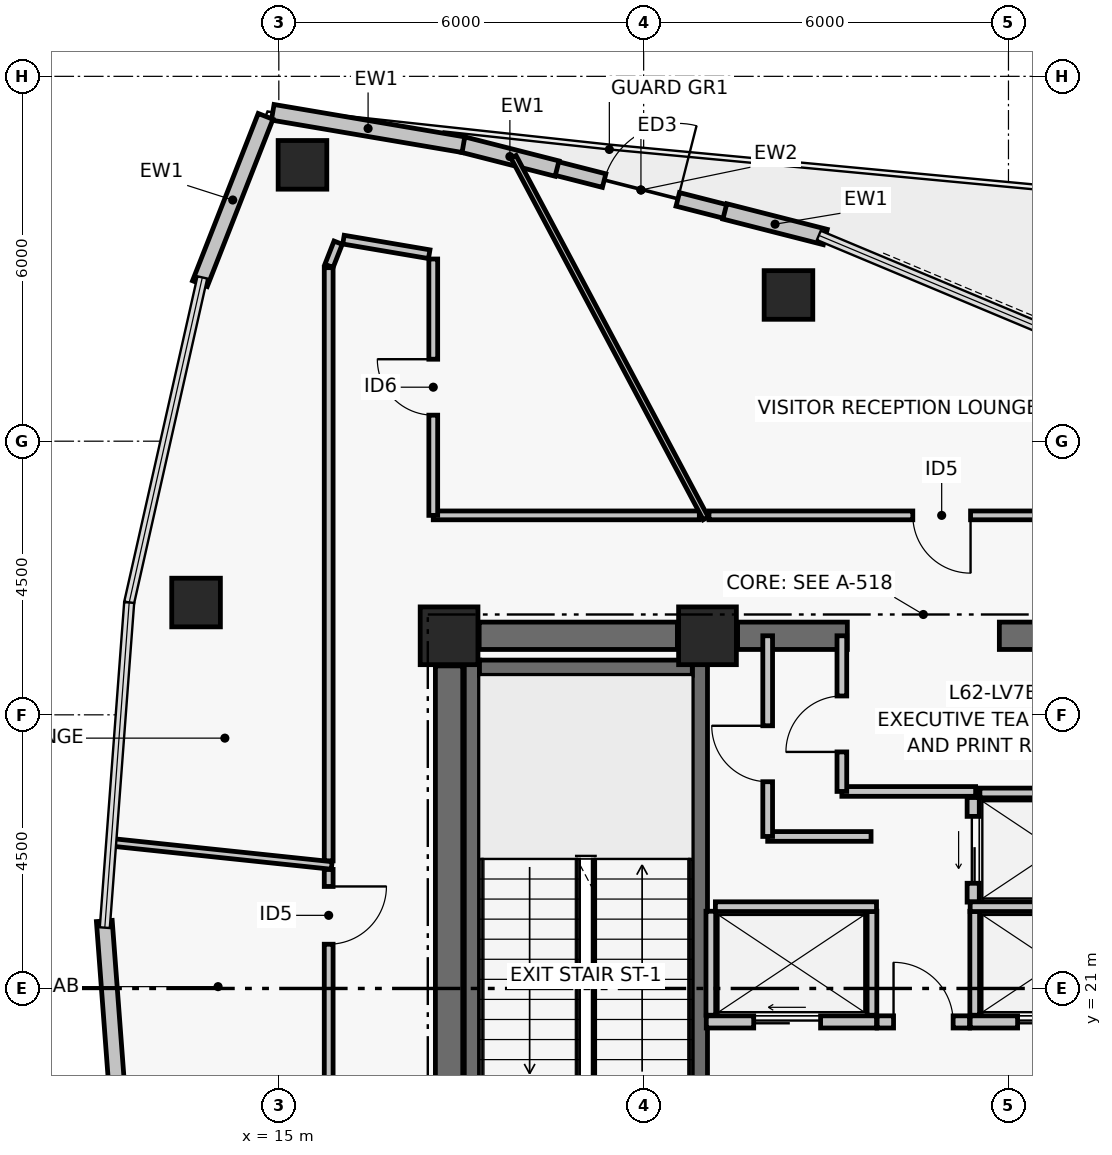
"""IFC4 building model, lengths in metres.
Left out: names, types, materials, properties, quantities, classifications, styles, units other than length and angle.
Written with IfcOpenShell. Run it as: python <this file> out.ifc"""

import sys

from ifc_helpers import new_model, si_unit, direction, frame, frame_2d, origin, origin_2d, place, context, subcontext, project, spatial, rectangle, hollow_rectangle, extrude, element, fill, save


model = new_model("IFC4")
c1 = context("Model", 3, precision=1e-05, world=origin(), true_north=direction((0.0, 1.0)))
c2 = subcontext(c1, "Body", "Model", "MODEL_VIEW")
j1 = project(units=[si_unit("LENGTHUNIT", "METRE"), si_unit("PLANEANGLEUNIT", "RADIAN")], contexts=[c1])
p1 = place(None, origin())
s1 = spatial("IfcSite", under=j1, at=p1, CompositionType="ELEMENT")
p2 = place(p1, origin())
s2 = spatial("IfcBuilding", under=s1, at=p2, CompositionType="ELEMENT")
p3 = place(p2, frame((0.0, 0.0, 247.14)))
s3 = spatial("IfcBuildingStorey", under=s2, at=p3, CompositionType="ELEMENT", Elevation=247.14)
for number, where, z_axis, x_axis in (
    (1, (17.8, 26.8, 0.0), (0.0, 0.0, 1.0), (1.0, 0.0, 0.0)),
    (2, (22.05, 26.8, 0.0), (0.0, 0.0, 1.0), (1.0, 0.0, 0.0)),
):
    element("IfcColumn", number, at=place(p3, frame(where, z_axis=z_axis, x_axis=x_axis)), inside=s3, PredefinedType="COLUMN", context=c2, shape_type="SweptSolid", body=[
        extrude(rectangle(XDim=0.95, YDim=0.95, at=origin_2d()), origin(), (0.0, 0.0, 1.0), 3.72),
    ])
p4 = place(p3, frame((18.295, 26.8, 0.0), z_axis=(0.0, 0.0, 1.0), x_axis=(1.0, 0.0, 0.0)))
e3 = element("IfcWall", 3, at=p4, inside=s3, PredefinedType="SHEAR", context=c2, shape_type="SweptSolid", body=[
    extrude(rectangle(XDim=3.26, YDim=0.45, at=frame_2d((1.63, 0.0))), origin(), (0.0, 0.0, 1.0), 3.5),
])
p5 = place(p3, frame((22.545, 26.8, 0.0), z_axis=(0.0, 0.0, 1.0), x_axis=(1.0, 0.0, 0.0)))
e4 = element("IfcWall", 4, at=p5, inside=s3, PredefinedType="SHEAR", context=c2, shape_type="SweptSolid", body=[
    extrude(rectangle(XDim=1.805, YDim=0.45, at=frame_2d((0.903, 0.0))), origin(), (0.0, 0.0, 1.0), 3.5),
])
p6 = place(p3, frame((26.85, 26.8, 0.0), z_axis=(0.0, 0.0, 1.0), x_axis=(1.0, 0.0, 0.0)))
e5 = element("IfcWall", 5, at=p6, inside=s3, PredefinedType="SHEAR", context=c2, shape_type="SweptSolid", body=[
    extrude(rectangle(XDim=1.805, YDim=0.45, at=frame_2d((0.902, 0.0))), origin(), (0.0, 0.0, 1.0), 3.5),
])
p7 = place(p3, frame((17.8, 17.695, 0.0), z_axis=(0.0, 0.0, 1.0), x_axis=(0.0, 1.0, 0.0)))
e6 = element("IfcWall", 6, at=p7, inside=s3, PredefinedType="SHEAR", context=c2, shape_type="SweptSolid", body=[
    extrude(rectangle(XDim=8.61, YDim=0.45, at=frame_2d((4.305, 0.0))), origin(), (0.0, 0.0, 1.0), 3.5),
])
p8 = place(p3, frame((18.175, 17.6, 0.0), z_axis=(0.0, 0.0, 1.0), x_axis=(0.0, 1.0, 0.0)))
e7 = element("IfcWall", 7, at=p8, inside=s3, PredefinedType="SHEAR", context=c2, shape_type="SweptSolid", body=[
    extrude(rectangle(XDim=8.8, YDim=0.25, at=frame_2d((4.4, 0.0))), origin(), (0.0, 0.0, 1.0), 3.5),
])
p9 = place(p3, frame((21.925, 17.6, 0.0), z_axis=(0.0, 0.0, 1.0), x_axis=(0.0, 1.0, 0.0)))
e8 = element("IfcWall", 8, at=p9, inside=s3, PredefinedType="SHEAR", context=c2, shape_type="SweptSolid", body=[
    extrude(rectangle(XDim=8.8, YDim=0.25, at=frame_2d((4.4, 0.0))), origin(), (0.0, 0.0, 1.0), 3.5),
])
p10 = place(p9, frame((0.35, 0.0, 0.0)))
e9 = element("IfcOpeningElement", 9, at=p10, cuts=e8, PredefinedType="OPENING", context=c2, shape_type="SweptSolid", body=[
    extrude(rectangle(XDim=1.05, YDim=2.08, at=frame_2d((0.525, 1.04))), frame((0.0, 0.135, 0.0), z_axis=(0.0, -1.0, 0.0), x_axis=(1.0, 0.0, 0.0)), (0.0, 0.0, 1.0), 0.27),
])
p11 = place(p3, frame((18.3, 26.275, 0.0), z_axis=(0.0, 0.0, 1.0), x_axis=(1.0, 0.0, 0.0)))
e10 = element("IfcWall", 10, at=p11, inside=s3, PredefinedType="SHEAR", context=c2, shape_type="SweptSolid", body=[
    extrude(rectangle(XDim=3.5, YDim=0.25, at=frame_2d((1.75, 0.0))), origin(), (0.0, 0.0, 1.0), 3.5),
])
for number, where, z_axis, x_axis in (
    (11, (23.382, 32.405, 0.0), (0.0, 0.0, 1.0), (1.0, 0.0, 0.0)),
    (12, (15.389, 34.545, 0.0), (0.0, 0.0, 1.0), (1.0, 0.0, 0.0)),
    (13, (13.639, 27.347, 0.0), (0.0, 0.0, 1.0), (1.0, 0.0, 0.0)),
):
    element("IfcColumn", number, at=place(p3, frame(where, z_axis=z_axis, x_axis=x_axis)), inside=s3, PredefinedType="COLUMN", context=c2, shape_type="SweptSolid", body=[
        extrude(hollow_rectangle(XDim=0.8, YDim=0.8, WallThickness=0.035, at=origin_2d()), origin(), (0.0, 0.0, 1.0), 3.72),
    ])
p12 = place(p3, frame((19.564, 34.486, 0.0), z_axis=(0.0, 0.0, 1.0), x_axis=(0.968966245317, -0.247193073198, 0.0)))
e14 = element("IfcWall", 14, at=p12, inside=s3, PredefinedType="PARTITIONING", context=c2, shape_type="SweptSolid", body=[
    extrude(rectangle(XDim=2.872, YDim=0.23, at=frame_2d((1.436, 0.0))), origin(), (0.0, 0.0, 1.0), 3.5),
])
p13 = place(p12, frame((0.811, 0.0, 0.0)))
e15 = element("IfcOpeningElement", 15, at=p13, cuts=e14, PredefinedType="OPENING", context=c2, shape_type="SweptSolid", body=[
    extrude(rectangle(XDim=1.25, YDim=2.1, at=frame_2d((0.625, 1.05))), frame((0.0, 0.125, 0.0), z_axis=(0.0, -1.0, 0.0), x_axis=(1.0, 0.0, 0.0)), (0.0, 0.0, 1.0), 0.25),
])
p14 = place(p3, frame((22.335, 33.779, 0.0), z_axis=(0.0, 0.0, 1.0), x_axis=(0.968986308148, -0.247114416055, 0.0)))
e16 = element("IfcWall", 16, at=p14, inside=s3, PredefinedType="PARTITIONING", context=c2, shape_type="SweptSolid", body=[
    extrude(rectangle(XDim=1.705, YDim=0.26, at=frame_2d((0.853, 0.0))), origin(), (0.0, 0.0, 1.0), 3.5),
])
p15 = place(p3, frame((18.024, 34.879, 0.0), z_axis=(0.0, 0.0, 1.0), x_axis=(0.968974449895, -0.247160910036, 0.0)))
e17 = element("IfcWall", 17, at=p15, inside=s3, PredefinedType="PARTITIONING", context=c2, shape_type="SweptSolid", body=[
    extrude(rectangle(XDim=1.601, YDim=0.26, at=frame_2d((0.801, 0.0))), origin(), (0.0, 0.0, 1.0), 3.5),
])
p16 = place(p3, frame((14.9, 35.409, 0.0), z_axis=(0.0, 0.0, 1.0), x_axis=(0.985889432766, -0.167397808709, 0.0)))
e18 = element("IfcWall", 18, at=p16, inside=s3, PredefinedType="PARTITIONING", context=c2, shape_type="SweptSolid", body=[
    extrude(rectangle(XDim=3.181, YDim=0.26, at=frame_2d((1.59, 0.0))), origin(), (0.0, 0.0, 1.0), 3.5),
])
p17 = place(p3, frame((13.702, 32.591, 0.0), z_axis=(0.0, 0.0, 1.0), x_axis=(0.365529693114, 0.930799679551, 0.0)))
e19 = element("IfcWall", 19, at=p17, inside=s3, PredefinedType="PARTITIONING", context=c2, shape_type="SweptSolid", body=[
    extrude(rectangle(XDim=2.956, YDim=0.26, at=frame_2d((1.478, 0.0))), origin(), (0.0, 0.0, 1.0), 3.5),
])
p18 = place(p3, frame((12.547, 16.544, 0.0), z_axis=(0.0, 0.0, 1.0), x_axis=(-0.074752976501, 0.99720208208, 0.0)))
e20 = element("IfcWall", 20, at=p18, inside=s3, PredefinedType="PARTITIONING", context=c2, shape_type="SweptSolid", body=[
    extrude(rectangle(XDim=5.582, YDim=0.26, at=frame_2d((2.791, 0.0))), origin(), (0.0, 0.0, 1.0), 3.5),
])
p19 = place(p3, frame((24.84, 20.45, 0.0), z_axis=(0.0, 0.0, 1.0), x_axis=(1.0, 0.0, 0.0)))
e21 = element("IfcWall", 21, at=p19, inside=s3, PredefinedType="PARTITIONING", context=c2, shape_type="SweptSolid", body=[
    extrude(rectangle(XDim=1.52, YDim=0.2, at=frame_2d((0.76, 0.0))), origin(), (0.0, 0.0, 1.0), 3.5),
])
p20 = place(p19, frame((0.27, 0.0, 0.0)))
e22 = element("IfcOpeningElement", 22, at=p20, cuts=e21, PredefinedType="OPENING", context=c2, shape_type="SweptSolid", body=[
    extrude(rectangle(XDim=0.98, YDim=2.06, at=frame_2d((0.49, 1.03))), frame((0.0, 0.11, 0.0), z_axis=(0.0, -1.0, 0.0), x_axis=(1.0, 0.0, 0.0)), (0.0, 0.0, 1.0), 0.22),
])
p21 = place(p3, frame((22.03, 20.45, 0.0), z_axis=(0.0, 0.0, 1.0), x_axis=(1.0, 0.0, 0.0)))
e23 = element("IfcWall", 23, at=p21, inside=s3, PredefinedType="PARTITIONING", context=c2, shape_type="SweptSolid", body=[
    extrude(rectangle(XDim=2.8, YDim=0.2, at=frame_2d((1.4, 0.0))), origin(), (0.0, 0.0, 1.0), 3.5),
])
p22 = place(p21, frame((0.78, 0.0, 0.0)))
e24 = element("IfcOpeningElement", 24, at=p22, cuts=e23, PredefinedType="OPENING", context=c2, shape_type="SweptSolid", body=[
    extrude(rectangle(XDim=1.1, YDim=2.08, at=frame_2d((0.55, 1.04))), frame((0.0, 0.11, 0.0), z_axis=(0.0, -1.0, 0.0), x_axis=(1.0, 0.0, 0.0)), (0.0, 0.0, 1.0), 0.22),
])
p23 = place(p3, frame((26.37, 20.45, 0.0), z_axis=(0.0, 0.0, 1.0), x_axis=(1.0, 0.0, 0.0)))
e25 = element("IfcWall", 25, at=p23, inside=s3, PredefinedType="PARTITIONING", context=c2, shape_type="SweptSolid", body=[
    extrude(rectangle(XDim=2.8, YDim=0.2, at=frame_2d((1.4, 0.0))), origin(), (0.0, 0.0, 1.0), 3.5),
])
p24 = place(p23, frame((0.78, 0.0, 0.0)))
e26 = element("IfcOpeningElement", 26, at=p24, cuts=e25, PredefinedType="OPENING", context=c2, shape_type="SweptSolid", body=[
    extrude(rectangle(XDim=1.1, YDim=2.08, at=frame_2d((0.55, 1.04))), frame((0.0, 0.11, 0.0), z_axis=(0.0, -1.0, 0.0), x_axis=(1.0, 0.0, 0.0)), (0.0, 0.0, 1.0), 0.22),
])
p25 = place(p3, frame((26.42, 22.42, 0.0), z_axis=(0.0, 0.0, 1.0), x_axis=(0.0, 1.0, 0.0)))
e27 = element("IfcWall", 27, at=p25, inside=s3, PredefinedType="PARTITIONING", context=c2, shape_type="SweptSolid", body=[
    extrude(rectangle(XDim=1.72, YDim=0.2, at=frame_2d((0.86, 0.0))), origin(), (0.0, 0.0, 1.0), 3.5),
])
p26 = place(p25, frame((0.31, 0.0, 0.0)))
e28 = element("IfcOpeningElement", 28, at=p26, cuts=e27, PredefinedType="OPENING", context=c2, shape_type="SweptSolid", body=[
    extrude(rectangle(XDim=1.1, YDim=2.08, at=frame_2d((0.55, 1.04))), frame((0.0, 0.11, 0.0), z_axis=(0.0, -1.0, 0.0), x_axis=(1.0, 0.0, 0.0)), (0.0, 0.0, 1.0), 0.22),
])
for number, where, z_axis, x_axis in (
    (29, (22.105, 20.56, 0.0), (0.0, 0.0, 1.0), (0.0, 1.0, 0.0)),
    (30, (24.755, 20.56, 0.0), (0.0, 0.0, 1.0), (0.0, 1.0, 0.0)),
):
    element("IfcWall", number, at=place(p3, frame(where, z_axis=z_axis, x_axis=x_axis)), inside=s3, PredefinedType="PARTITIONING", context=c2, shape_type="SweptSolid", body=[
        extrude(rectangle(XDim=1.71, YDim=0.16, at=frame_2d((0.855, 0.0))), origin(), (0.0, 0.0, 1.0), 3.5),
    ])
p27 = place(p3, frame((22.18, 22.345, 0.0), z_axis=(0.0, 0.0, 1.0), x_axis=(1.0, 0.0, 0.0)))
e31 = element("IfcWall", 31, at=p27, inside=s3, PredefinedType="PARTITIONING", context=c2, shape_type="SweptSolid", body=[
    extrude(rectangle(XDim=2.65, YDim=0.16, at=frame_2d((1.325, 0.0))), origin(), (0.0, 0.0, 1.0), 3.5),
])
p28 = place(p3, frame((26.445, 20.56, 0.0), z_axis=(0.0, 0.0, 1.0), x_axis=(0.0, 1.0, 0.0)))
e32 = element("IfcWall", 32, at=p28, inside=s3, PredefinedType="PARTITIONING", context=c2, shape_type="SweptSolid", body=[
    extrude(rectangle(XDim=1.71, YDim=0.16, at=frame_2d((0.855, 0.0))), origin(), (0.0, 0.0, 1.0), 3.5),
])
p29 = place(p3, frame((26.37, 22.345, 0.0), z_axis=(0.0, 0.0, 1.0), x_axis=(1.0, 0.0, 0.0)))
e33 = element("IfcWall", 33, at=p29, inside=s3, PredefinedType="PARTITIONING", context=c2, shape_type="SweptSolid", body=[
    extrude(rectangle(XDim=2.65, YDim=0.16, at=frame_2d((1.325, 0.0))), origin(), (0.0, 0.0, 1.0), 3.5),
])
p30 = place(p3, frame((26.53, 24.215, 0.0), z_axis=(0.0, 0.0, 1.0), x_axis=(1.0, 0.0, 0.0)))
e34 = element("IfcWall", 34, at=p30, inside=s3, PredefinedType="PARTITIONING", context=c2, shape_type="SweptSolid", body=[
    extrude(rectangle(XDim=2.49, YDim=0.16, at=frame_2d((1.245, 0.0))), origin(), (0.0, 0.0, 1.0), 3.5),
])
p31 = place(p3, frame((23.04, 23.5, 0.0), z_axis=(0.0, 0.0, 1.0), x_axis=(1.0, 0.0, 0.0)))
e35 = element("IfcWall", 35, at=p31, inside=s3, PredefinedType="PARTITIONING", context=c2, shape_type="SweptSolid", body=[
    extrude(rectangle(XDim=1.7, YDim=0.16, at=frame_2d((0.85, 0.0))), origin(), (0.0, 0.0, 1.0), 3.5),
])
p32 = place(p3, frame((23.04, 23.5, 0.0), z_axis=(0.0, 0.0, 1.0), x_axis=(0.0, 1.0, 0.0)))
e36 = element("IfcWall", 36, at=p32, inside=s3, PredefinedType="PARTITIONING", context=c2, shape_type="SweptSolid", body=[
    extrude(rectangle(XDim=3.3, YDim=0.16, at=frame_2d((1.65, 0.0))), origin(), (0.0, 0.0, 1.0), 2.63),
])
p33 = place(p32, frame((0.9, 0.0, 0.0)))
e37 = element("IfcOpeningElement", 37, at=p33, cuts=e36, PredefinedType="OPENING", context=c2, shape_type="SweptSolid", body=[
    extrude(rectangle(XDim=0.92, YDim=2.05, at=frame_2d((0.46, 1.025))), frame((0.0, 0.09, 0.0), z_axis=(0.0, -1.0, 0.0), x_axis=(1.0, 0.0, 0.0)), (0.0, 0.0, 1.0), 0.18),
])
p34 = place(p3, frame((24.26, 24.24, 0.0), z_axis=(0.0, 0.0, 1.0), x_axis=(1.0, 0.0, 0.0)))
e38 = element("IfcWall", 38, at=p34, inside=s3, PredefinedType="PARTITIONING", context=c2, shape_type="SweptSolid", body=[
    extrude(rectangle(XDim=2.2, YDim=0.16, at=frame_2d((1.1, 0.0))), origin(), (0.0, 0.0, 1.0), 3.5),
])
p35 = place(p3, frame((24.26, 24.24, 0.0), z_axis=(0.0, 0.0, 1.0), x_axis=(0.0, 1.0, 0.0)))
e39 = element("IfcWall", 39, at=p35, inside=s3, PredefinedType="PARTITIONING", context=c2, shape_type="SweptSolid", body=[
    extrude(rectangle(XDim=2.56, YDim=0.16, at=frame_2d((1.28, 0.0))), origin(), (0.0, 0.0, 1.0), 2.63),
])
p36 = place(p35, frame((0.65, 0.0, 0.0)))
e40 = element("IfcOpeningElement", 40, at=p36, cuts=e39, PredefinedType="OPENING", context=c2, shape_type="SweptSolid", body=[
    extrude(rectangle(XDim=0.92, YDim=2.05, at=frame_2d((0.46, 1.025))), frame((0.0, 0.09, 0.0), z_axis=(0.0, -1.0, 0.0), x_axis=(1.0, 0.0, 0.0)), (0.0, 0.0, 1.0), 0.18),
])
p37 = place(p3, frame((15.82, 22.958, 0.0), z_axis=(0.0, 0.0, 1.0), x_axis=(0.0, -1.0, 0.0)))
e41 = element("IfcWall", 41, at=p37, inside=s3, PredefinedType="PARTITIONING", context=c2, shape_type="SweptSolid", body=[
    extrude(rectangle(XDim=11.811, YDim=0.145, at=frame_2d((5.906, 0.0))), origin(), (0.0, 0.0, 1.0), 2.78),
])
p38 = place(p37, frame((0.28, 0.0, 0.0)))
e42 = element("IfcOpeningElement", 42, at=p38, cuts=e41, PredefinedType="OPENING", context=c2, shape_type="SweptSolid", body=[
    extrude(rectangle(XDim=0.95, YDim=2.06, at=frame_2d((0.475, 1.03))), frame((0.0, 0.083, 0.0), z_axis=(0.0, -1.0, 0.0), x_axis=(1.0, 0.0, 0.0)), (0.0, 0.0, 1.0), 0.165),
])
p39 = place(p3, frame((28.5, 28.78, 0.0), z_axis=(0.0, 0.0, 1.0), x_axis=(-1.0, 0.0, 0.0)))
e43 = element("IfcWall", 43, at=p39, inside=s3, PredefinedType="PARTITIONING", context=c2, shape_type="SweptSolid", body=[
    extrude(rectangle(XDim=6.426, YDim=0.145, at=frame_2d((3.213, 0.0))), origin(), (0.0, 0.0, 1.0), 2.78),
])
p40 = place(p39, frame((2.123, 0.0, 0.0)))
e44 = element("IfcOpeningElement", 44, at=p40, cuts=e43, PredefinedType="OPENING", context=c2, shape_type="SweptSolid", body=[
    extrude(rectangle(XDim=0.95, YDim=2.06, at=frame_2d((0.475, 1.03))), frame((0.0, 0.083, 0.0), z_axis=(0.0, -1.0, 0.0), x_axis=(1.0, 0.0, 0.0)), (0.0, 0.0, 1.0), 0.165),
])
p41 = place(p3, frame((21.916, 28.78, 0.0), z_axis=(0.0, 0.0, 1.0), x_axis=(-1.0, 0.0, 0.0)))
e45 = element("IfcWall", 45, at=p41, inside=s3, PredefinedType="PARTITIONING", context=c2, shape_type="SweptSolid", body=[
    extrude(rectangle(XDim=4.376, YDim=0.145, at=frame_2d((2.188, 0.0))), origin(), (0.0, 0.0, 1.0), 3.13),
])
p42 = place(p3, frame((17.54, 28.78, 0.0), z_axis=(0.0, 0.0, 1.0), x_axis=(0.0, 1.0, 0.0)))
e46 = element("IfcWall", 46, at=p42, inside=s3, PredefinedType="PARTITIONING", context=c2, shape_type="SweptSolid", body=[
    extrude(rectangle(XDim=4.216, YDim=0.145, at=frame_2d((2.108, 0.0))), origin(), (0.0, 0.0, 1.0), 3.13),
])
p43 = place(p42, frame((1.648, 0.0, 0.0)))
e47 = element("IfcOpeningElement", 47, at=p43, cuts=e46, PredefinedType="OPENING", context=c2, shape_type="SweptSolid", body=[
    extrude(rectangle(XDim=0.92, YDim=2.05, at=frame_2d((0.46, 1.025))), frame((0.0, 0.083, 0.0), z_axis=(0.0, -1.0, 0.0), x_axis=(1.0, 0.0, 0.0)), (0.0, 0.0, 1.0), 0.165),
])
p44 = place(p3, frame((17.473, 33.075, 0.0), z_axis=(0.0, 0.0, 1.0), x_axis=(-0.985881780308, 0.167442871621, 0.0)))
e48 = element("IfcWall", 48, at=p44, inside=s3, PredefinedType="PARTITIONING", context=c2, shape_type="SweptSolid", body=[
    extrude(rectangle(XDim=1.43, YDim=0.145, at=frame_2d((0.715, 0.0))), origin(), (0.0, 0.0, 1.0), 3.13),
])
p45 = place(p3, frame((15.975, 33.265, 0.0), z_axis=(0.0, 0.0, 1.0), x_axis=(-0.365633948196, -0.930758731319, 0.0)))
e49 = element("IfcWall", 49, at=p45, inside=s3, PredefinedType="PARTITIONING", context=c2, shape_type="SweptSolid", body=[
    extrude(rectangle(XDim=0.41, YDim=0.145, at=frame_2d((0.205, 0.0))), origin(), (0.0, 0.0, 1.0), 2.78),
])
p46 = place(p3, frame((15.82, 32.854, 0.0), z_axis=(0.0, 0.0, 1.0), x_axis=(0.0, -1.0, 0.0)))
e50 = element("IfcWall", 50, at=p46, inside=s3, PredefinedType="PARTITIONING", context=c2, shape_type="SweptSolid", body=[
    extrude(rectangle(XDim=9.755, YDim=0.145, at=frame_2d((4.878, 0.0))), origin(), (0.0, 0.0, 1.0), 2.78),
])
p47 = place(p3, frame((22.021, 28.73, 0.0), z_axis=(0.0, 0.0, 1.0), x_axis=(-0.469464454367, 0.882951372435, 0.0)))
e51 = element("IfcWall", 51, at=p47, inside=s3, PredefinedType="PARTITIONING", context=c2, shape_type="SweptSolid", body=[
    extrude(rectangle(XDim=6.734, YDim=0.095, at=frame_2d((3.367, 0.0))), origin(), (0.0, 0.0, 1.0), 2.98),
])
p48 = place(p3, frame((15.87, 23.023, 0.0), z_axis=(0.0, 0.0, 1.0), x_axis=(-0.994526285713, 0.104486683482, 0.0)))
e52 = element("IfcWall", 52, at=p48, inside=s3, PredefinedType="PARTITIONING", context=c2, shape_type="SweptSolid", body=[
    extrude(rectangle(XDim=3.657, YDim=0.125, at=frame_2d((1.828, 0.0))), origin(), (0.0, 0.0, 1.0), 2.98),
])
p49 = place(p13, origin())
e53 = element("IfcDoor", 53, at=p49, inside=s3, OperationType="SINGLE_SWING_RIGHT", PredefinedType="DOOR", context=c2, shape_type="SweptSolid", body=[
    extrude(rectangle(XDim=1.25, YDim=2.1, at=frame_2d((0.625, 1.05))), frame((0.0, 0.025, 0.0), z_axis=(0.0, -1.0, 0.0), x_axis=(1.0, 0.0, 0.0)), (0.0, 0.0, 1.0), 0.05),
])
fill(e15, e53)
p50 = place(p20, origin())
e54 = element("IfcDoor", 54, at=p50, inside=s3, OperationType="SINGLE_SWING_LEFT", PredefinedType="DOOR", context=c2, shape_type="SweptSolid", body=[
    extrude(rectangle(XDim=0.98, YDim=2.06, at=frame_2d((0.49, 1.03))), frame((0.0, 0.025, 0.0), z_axis=(0.0, -1.0, 0.0), x_axis=(1.0, 0.0, 0.0)), (0.0, 0.0, 1.0), 0.05),
])
fill(e22, e54)
p51 = place(p22, origin())
e55 = element("IfcDoor", 55, at=p51, inside=s3, OperationType="DOUBLE_DOOR_SLIDING", PredefinedType="DOOR", context=c2, shape_type="SweptSolid", body=[
    extrude(rectangle(XDim=1.1, YDim=2.08, at=frame_2d((0.55, 1.04))), frame((0.0, 0.025, 0.0), z_axis=(0.0, -1.0, 0.0), x_axis=(1.0, 0.0, 0.0)), (0.0, 0.0, 1.0), 0.05),
])
fill(e24, e55)
p52 = place(p24, origin())
e56 = element("IfcDoor", 56, at=p52, inside=s3, OperationType="DOUBLE_DOOR_SLIDING", PredefinedType="DOOR", context=c2, shape_type="SweptSolid", body=[
    extrude(rectangle(XDim=1.1, YDim=2.08, at=frame_2d((0.55, 1.04))), frame((0.0, 0.025, 0.0), z_axis=(0.0, -1.0, 0.0), x_axis=(1.0, 0.0, 0.0)), (0.0, 0.0, 1.0), 0.05),
])
fill(e26, e56)
p53 = place(p26, origin())
e57 = element("IfcDoor", 57, at=p53, inside=s3, OperationType="DOUBLE_DOOR_SLIDING", PredefinedType="DOOR", context=c2, shape_type="SweptSolid", body=[
    extrude(rectangle(XDim=1.1, YDim=2.08, at=frame_2d((0.55, 1.04))), frame((0.0, 0.025, 0.0), z_axis=(0.0, -1.0, 0.0), x_axis=(1.0, 0.0, 0.0)), (0.0, 0.0, 1.0), 0.05),
])
fill(e28, e57)
p54 = place(p33, origin())
e58 = element("IfcDoor", 58, at=p54, inside=s3, OperationType="SINGLE_SWING_RIGHT", PredefinedType="DOOR", context=c2, shape_type="SweptSolid", body=[
    extrude(rectangle(XDim=0.92, YDim=2.05, at=frame_2d((0.46, 1.025))), frame((0.0, 0.025, 0.0), z_axis=(0.0, -1.0, 0.0), x_axis=(1.0, 0.0, 0.0)), (0.0, 0.0, 1.0), 0.05),
])
fill(e37, e58)
p55 = place(p36, origin())
e59 = element("IfcDoor", 59, at=p55, inside=s3, OperationType="SINGLE_SWING_LEFT", PredefinedType="DOOR", context=c2, shape_type="SweptSolid", body=[
    extrude(rectangle(XDim=0.92, YDim=2.05, at=frame_2d((0.46, 1.025))), frame((0.0, 0.025, 0.0), z_axis=(0.0, -1.0, 0.0), x_axis=(1.0, 0.0, 0.0)), (0.0, 0.0, 1.0), 0.05),
])
fill(e40, e59)
p56 = place(p38, origin())
e60 = element("IfcDoor", 60, at=p56, inside=s3, OperationType="SINGLE_SWING_LEFT", PredefinedType="DOOR", context=c2, shape_type="SweptSolid", body=[
    extrude(rectangle(XDim=0.95, YDim=2.06, at=frame_2d((0.475, 1.03))), frame((0.0, 0.025, 0.0), z_axis=(0.0, -1.0, 0.0), x_axis=(1.0, 0.0, 0.0)), (0.0, 0.0, 1.0), 0.05),
])
fill(e42, e60)
p57 = place(p40, origin())
e61 = element("IfcDoor", 61, at=p57, inside=s3, OperationType="SINGLE_SWING_LEFT", PredefinedType="DOOR", context=c2, shape_type="SweptSolid", body=[
    extrude(rectangle(XDim=0.95, YDim=2.06, at=frame_2d((0.475, 1.03))), frame((0.0, 0.025, 0.0), z_axis=(0.0, -1.0, 0.0), x_axis=(1.0, 0.0, 0.0)), (0.0, 0.0, 1.0), 0.05),
])
fill(e44, e61)
p58 = place(p43, origin())
e62 = element("IfcDoor", 62, at=p58, inside=s3, OperationType="SINGLE_SWING_RIGHT", PredefinedType="DOOR", context=c2, shape_type="SweptSolid", body=[
    extrude(rectangle(XDim=0.92, YDim=2.05, at=frame_2d((0.46, 1.025))), frame((0.0, 0.025, 0.0), z_axis=(0.0, -1.0, 0.0), x_axis=(1.0, 0.0, 0.0)), (0.0, 0.0, 1.0), 0.05),
])
fill(e47, e62)
save(model, sys.argv[1])
